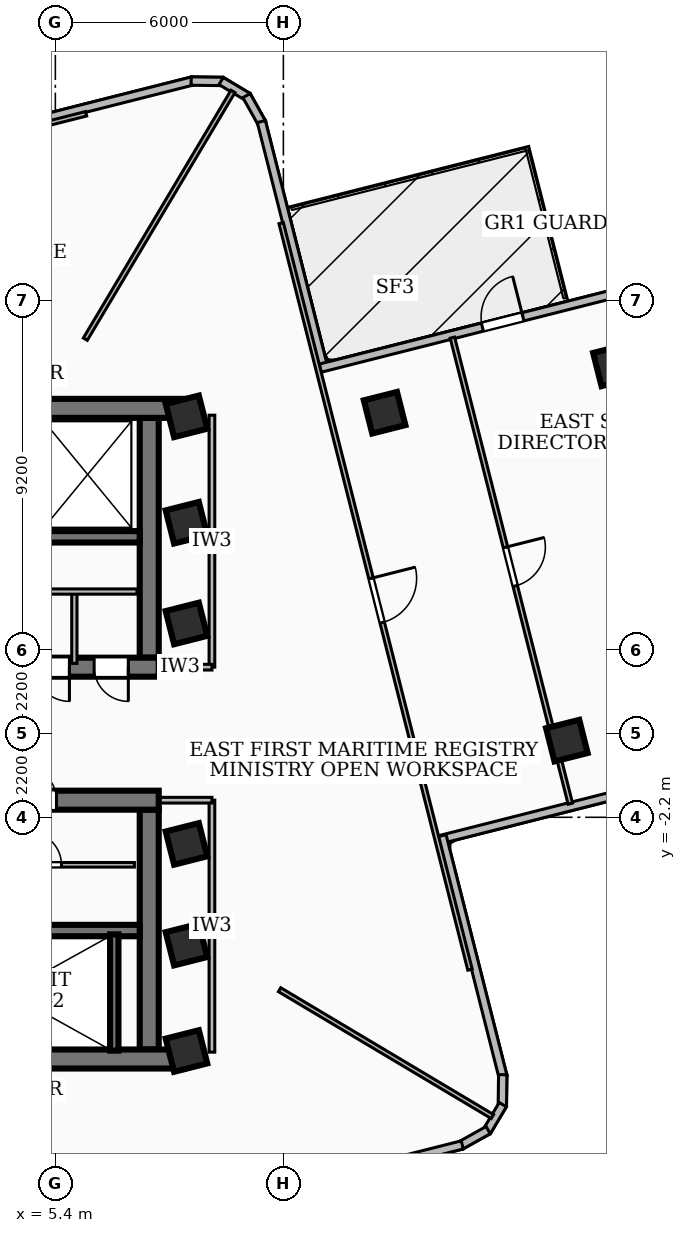
"""IFC4 building model, lengths in metres.
Left out: names, types, materials, properties, quantities, classifications, styles, units other than length and angle.
Written with IfcOpenShell. Run it as: python <this file> out.ifc"""

import sys

from ifc_helpers import new_model, si_unit, direction, frame, frame_2d, origin, origin_2d, place, context, subcontext, project, spatial, rectangle, extrude, element, fill, save


model = new_model("IFC4")
c1 = context("Model", 3, precision=1e-05, world=origin(), true_north=direction((0.0, 1.0)))
c2 = subcontext(c1, "Body", "Model", "MODEL_VIEW")
j1 = project(units=[si_unit("LENGTHUNIT", "METRE"), si_unit("PLANEANGLEUNIT", "RADIAN")], contexts=[c1])
p1 = place(None, origin())
s1 = spatial("IfcSite", under=j1, at=p1, CompositionType="ELEMENT")
p2 = place(p1, origin())
s2 = spatial("IfcBuilding", under=s1, at=p2, CompositionType="ELEMENT")
p3 = place(p2, frame((0.0, 0.0, 130.68)))
s3 = spatial("IfcBuildingStorey", under=s2, at=p3, CompositionType="ELEMENT", Elevation=130.68)
p4 = place(p3, frame((-8.78, 8.56, 0.0), z_axis=(0.0, 0.0, 1.0), x_axis=(1.0, 0.0, 0.0)))
e1 = element("IfcWall", 1, at=p4, inside=s3, PredefinedType="SHEAR", context=c2, shape_type="SweptSolid", body=[
    extrude(rectangle(XDim=17.56, YDim=0.5, at=frame_2d((8.78, 0.0))), origin(), (0.0, 0.0, 1.0), 3.32),
])
p5 = place(p3, frame((8.12, 1.75, 0.0), z_axis=(0.0, 0.0, 1.0), x_axis=(-1.0, 0.0, 0.0)))
e2 = element("IfcWall", 2, at=p5, inside=s3, PredefinedType="SHEAR", context=c2, shape_type="SweptSolid", body=[
    extrude(rectangle(XDim=16.24, YDim=0.5, at=frame_2d((8.12, 0.0))), origin(), (0.0, 0.0, 1.0), 3.32),
])
p6 = place(p5, frame((7.45, 0.0, 0.0)))
e3 = element("IfcOpeningElement", 3, at=p6, cuts=e2, PredefinedType="OPENING", context=c2, shape_type="SweptSolid", body=[
    extrude(rectangle(XDim=1.0, YDim=2.1, at=frame_2d((0.5, 1.05))), frame((0.0, 0.26, 0.0), z_axis=(0.0, -1.0, 0.0), x_axis=(1.0, 0.0, 0.0)), (0.0, 0.0, 1.0), 0.52),
])
p7 = place(p5, frame((3.85, 0.0, 0.0)))
e4 = element("IfcOpeningElement", 4, at=p7, cuts=e2, PredefinedType="OPENING", context=c2, shape_type="SweptSolid", body=[
    extrude(rectangle(XDim=0.9, YDim=2.06, at=frame_2d((0.45, 1.03))), frame((0.0, 0.26, 0.0), z_axis=(0.0, -1.0, 0.0), x_axis=(1.0, 0.0, 0.0)), (0.0, 0.0, 1.0), 0.52),
])
p8 = place(p5, frame((2.35, 0.0, 0.0)))
e5 = element("IfcOpeningElement", 5, at=p8, cuts=e2, PredefinedType="OPENING", context=c2, shape_type="SweptSolid", body=[
    extrude(rectangle(XDim=0.9, YDim=2.06, at=frame_2d((0.45, 1.03))), frame((0.0, 0.26, 0.0), z_axis=(0.0, -1.0, 0.0), x_axis=(1.0, 0.0, 0.0)), (0.0, 0.0, 1.0), 0.52),
])
p9 = place(p5, frame((0.8, 0.0, 0.0)))
e6 = element("IfcOpeningElement", 6, at=p9, cuts=e2, PredefinedType="OPENING", context=c2, shape_type="SweptSolid", body=[
    extrude(rectangle(XDim=0.9, YDim=2.06, at=frame_2d((0.45, 1.03))), frame((0.0, 0.26, 0.0), z_axis=(0.0, -1.0, 0.0), x_axis=(1.0, 0.0, 0.0)), (0.0, 0.0, 1.0), 0.52),
])
p10 = place(p3, frame((7.87, 8.31, 0.0), z_axis=(0.0, 0.0, 1.0), x_axis=(0.0, -1.0, 0.0)))
e7 = element("IfcWall", 7, at=p10, inside=s3, PredefinedType="SHEAR", context=c2, shape_type="SweptSolid", body=[
    extrude(rectangle(XDim=6.31, YDim=0.5, at=frame_2d((3.155, 0.0))), origin(), (0.0, 0.0, 1.0), 3.32),
])
p11 = place(p3, frame((7.62, 5.18, 0.0), z_axis=(0.0, 0.0, 1.0), x_axis=(-1.0, 0.0, 0.0)))
e8 = element("IfcWall", 8, at=p11, inside=s3, PredefinedType="SOLIDWALL", context=c2, shape_type="SweptSolid", body=[
    extrude(rectangle(XDim=15.24, YDim=0.3, at=frame_2d((7.62, 0.0))), origin(), (0.0, 0.0, 1.0), 3.32),
])
p12 = place(p11, frame((5.77, 0.0, 0.0)))
e9 = element("IfcOpeningElement", 9, at=p12, cuts=e8, PredefinedType="OPENING", context=c2, shape_type="SweptSolid", body=[
    extrude(rectangle(XDim=1.1, YDim=2.15, at=frame_2d((0.55, 1.075))), frame((0.0, 0.16, 0.0), z_axis=(0.0, -1.0, 0.0), x_axis=(1.0, 0.0, 0.0)), (0.0, 0.0, 1.0), 0.32),
])
p13 = place(p11, frame((2.97, 0.0, 0.0)))
e10 = element("IfcOpeningElement", 10, at=p13, cuts=e8, PredefinedType="OPENING", context=c2, shape_type="SweptSolid", body=[
    extrude(rectangle(XDim=1.1, YDim=2.15, at=frame_2d((0.55, 1.075))), frame((0.0, 0.16, 0.0), z_axis=(0.0, -1.0, 0.0), x_axis=(1.0, 0.0, 0.0)), (0.0, 0.0, 1.0), 0.32),
])
p14 = place(p11, frame((7.97, 0.0, 0.0)))
e11 = element("IfcOpeningElement", 11, at=p14, cuts=e8, PredefinedType="OPENING", context=c2, shape_type="SweptSolid", body=[
    extrude(rectangle(XDim=1.0, YDim=2.1, at=frame_2d((0.5, 1.05))), frame((0.0, 0.16, 0.0), z_axis=(0.0, -1.0, 0.0), x_axis=(1.0, 0.0, 0.0)), (0.0, 0.0, 1.0), 0.32),
])
p15 = place(p3, frame((8.78, -8.56, 0.0), z_axis=(0.0, 0.0, 1.0), x_axis=(-1.0, 0.0, 0.0)))
e12 = element("IfcWall", 12, at=p15, inside=s3, PredefinedType="SHEAR", context=c2, shape_type="SweptSolid", body=[
    extrude(rectangle(XDim=17.56, YDim=0.5, at=frame_2d((8.78, 0.0))), origin(), (0.0, 0.0, 1.0), 3.32),
])
p16 = place(p3, frame((-8.12, -1.75, 0.0), z_axis=(0.0, 0.0, 1.0), x_axis=(1.0, 0.0, 0.0)))
e13 = element("IfcWall", 13, at=p16, inside=s3, PredefinedType="SHEAR", context=c2, shape_type="SweptSolid", body=[
    extrude(rectangle(XDim=16.24, YDim=0.5, at=frame_2d((8.12, 0.0))), origin(), (0.0, 0.0, 1.0), 3.32),
])
p17 = place(p16, frame((7.45, 0.0, 0.0)))
e14 = element("IfcOpeningElement", 14, at=p17, cuts=e13, PredefinedType="OPENING", context=c2, shape_type="SweptSolid", body=[
    extrude(rectangle(XDim=1.0, YDim=2.1, at=frame_2d((0.5, 1.05))), frame((0.0, 0.26, 0.0), z_axis=(0.0, -1.0, 0.0), x_axis=(1.0, 0.0, 0.0)), (0.0, 0.0, 1.0), 0.52),
])
p18 = place(p16, frame((12.65, 0.0, 0.0)))
e15 = element("IfcOpeningElement", 15, at=p18, cuts=e13, PredefinedType="OPENING", context=c2, shape_type="SweptSolid", body=[
    extrude(rectangle(XDim=0.9, YDim=2.06, at=frame_2d((0.45, 1.03))), frame((0.0, 0.26, 0.0), z_axis=(0.0, -1.0, 0.0), x_axis=(1.0, 0.0, 0.0)), (0.0, 0.0, 1.0), 0.52),
])
p19 = place(p16, frame((0.565, 0.0, 0.0)))
e16 = element("IfcOpeningElement", 16, at=p19, cuts=e13, PredefinedType="OPENING", context=c2, shape_type="SweptSolid", body=[
    extrude(rectangle(XDim=1.05, YDim=2.15, at=frame_2d((0.525, 1.075))), frame((0.0, 0.26, 0.0), z_axis=(0.0, -1.0, 0.0), x_axis=(1.0, 0.0, 0.0)), (0.0, 0.0, 1.0), 0.52),
])
p20 = place(p16, frame((2.125, 0.0, 0.0)))
e17 = element("IfcOpeningElement", 17, at=p20, cuts=e13, PredefinedType="OPENING", context=c2, shape_type="SweptSolid", body=[
    extrude(rectangle(XDim=1.05, YDim=2.15, at=frame_2d((0.525, 1.075))), frame((0.0, 0.26, 0.0), z_axis=(0.0, -1.0, 0.0), x_axis=(1.0, 0.0, 0.0)), (0.0, 0.0, 1.0), 0.52),
])
p21 = place(p16, frame((3.685, 0.0, 0.0)))
e18 = element("IfcOpeningElement", 18, at=p21, cuts=e13, PredefinedType="OPENING", context=c2, shape_type="SweptSolid", body=[
    extrude(rectangle(XDim=1.05, YDim=2.15, at=frame_2d((0.525, 1.075))), frame((0.0, 0.26, 0.0), z_axis=(0.0, -1.0, 0.0), x_axis=(1.0, 0.0, 0.0)), (0.0, 0.0, 1.0), 0.52),
])
p22 = place(p3, frame((7.87, -2.0, 0.0), z_axis=(0.0, 0.0, 1.0), x_axis=(0.0, -1.0, 0.0)))
e19 = element("IfcWall", 19, at=p22, inside=s3, PredefinedType="SHEAR", context=c2, shape_type="SweptSolid", body=[
    extrude(rectangle(XDim=6.31, YDim=0.5, at=frame_2d((3.155, 0.0))), origin(), (0.0, 0.0, 1.0), 3.32),
])
p23 = place(p3, frame((-7.62, -5.18, 0.0), z_axis=(0.0, 0.0, 1.0), x_axis=(1.0, 0.0, 0.0)))
e20 = element("IfcWall", 20, at=p23, inside=s3, PredefinedType="SOLIDWALL", context=c2, shape_type="SweptSolid", body=[
    extrude(rectangle(XDim=15.24, YDim=0.3, at=frame_2d((7.62, 0.0))), origin(), (0.0, 0.0, 1.0), 3.32),
])
p24 = place(p23, frame((5.77, 0.0, 0.0)))
e21 = element("IfcOpeningElement", 21, at=p24, cuts=e20, PredefinedType="OPENING", context=c2, shape_type="SweptSolid", body=[
    extrude(rectangle(XDim=1.1, YDim=2.15, at=frame_2d((0.55, 1.075))), frame((0.0, 0.16, 0.0), z_axis=(0.0, -1.0, 0.0), x_axis=(1.0, 0.0, 0.0)), (0.0, 0.0, 1.0), 0.32),
])
p25 = place(p23, frame((7.97, 0.0, 0.0)))
e22 = element("IfcOpeningElement", 22, at=p25, cuts=e20, PredefinedType="OPENING", context=c2, shape_type="SweptSolid", body=[
    extrude(rectangle(XDim=1.0, YDim=2.1, at=frame_2d((0.5, 1.05))), frame((0.0, 0.16, 0.0), z_axis=(0.0, -1.0, 0.0), x_axis=(1.0, 0.0, 0.0)), (0.0, 0.0, 1.0), 0.32),
])
p26 = place(p3, frame((6.95, -8.34, 0.0), z_axis=(0.0, 0.0, 1.0), x_axis=(0.0, 1.0, 0.0)))
e23 = element("IfcWall", 23, at=p26, inside=s3, PredefinedType="SOLIDWALL", context=c2, shape_type="SweptSolid", body=[
    extrude(rectangle(XDim=3.06, YDim=0.22, at=frame_2d((1.53, 0.0))), origin(), (0.0, 0.0, 1.0), 3.32),
])
for number, where, z_axis, x_axis in (
    (24, (8.85, -5.55, 0.0), (0.0, 0.0, 1.0), (0.969, 0.245, 0.0)),
    (25, (8.85, -2.9, 0.0), (0.0, 0.0, 1.0), (0.969, 0.245, 0.0)),
    (26, (8.85, 2.9, 0.0), (0.0, 0.0, 1.0), (0.969, 0.245, 0.0)),
    (27, (8.85, 5.55, 0.0), (0.0, 0.0, 1.0), (0.969, 0.245, 0.0)),
    (28, (8.85, -8.35, 0.0), (0.0, 0.0, 1.0), (0.969, 0.245, 0.0)),
    (29, (8.85, 8.35, 0.0), (0.0, 0.0, 1.0), (0.969, 0.245, 0.0)),
    (30, (18.86, -0.183, 0.0), (0.0, 0.0, 1.0), (0.969, 0.245, 0.0)),
    (31, (14.064, 8.445, 0.0), (0.0, 0.0, 1.0), (0.969, 0.245, 0.0)),
    (32, (20.098, 9.692, 0.0), (0.0, 0.0, 1.0), (0.969, 0.245, 0.0)),
):
    element("IfcColumn", number, at=place(p3, frame(where, z_axis=z_axis, x_axis=x_axis)), inside=s3, PredefinedType="COLUMN", context=c2, shape_type="SweptSolid", body=[
        extrude(rectangle(XDim=0.9, YDim=0.9, at=origin_2d()), origin(), (0.0, 0.0, 1.0), 3.6),
    ])
p27 = place(p3, frame((2.684, 15.574, 0.0), z_axis=(0.0, 0.0, 1.0), x_axis=(0.969435490349, 0.245346347134, 0.0)))
e33 = element("IfcWall", 33, at=p27, inside=s3, PredefinedType="SOLIDWALL", context=c2, shape_type="SweptSolid", body=[
    extrude(rectangle(XDim=6.538, YDim=0.22, at=frame_2d((3.269, 0.0))), origin(), (0.0, 0.0, 1.0), 2.55),
])
p28 = place(p3, frame((8.973, 17.172, 0.0), z_axis=(0.0, 0.0, 1.0), x_axis=(0.999909345183, -0.013464821393, 0.0)))
e34 = element("IfcWall", 34, at=p28, inside=s3, PredefinedType="SOLIDWALL", context=c2, shape_type="SweptSolid", body=[
    extrude(rectangle(XDim=0.834, YDim=0.22, at=frame_2d((0.417, 0.0))), origin(), (0.0, 0.0, 1.0), 3.32),
])
p29 = place(p3, frame((9.761, 17.174, 0.0), z_axis=(0.0, 0.0, 1.0), x_axis=(0.858412031951, -0.512960801038, 0.0)))
e35 = element("IfcWall", 35, at=p29, inside=s3, PredefinedType="SOLIDWALL", context=c2, shape_type="SweptSolid", body=[
    extrude(rectangle(XDim=0.819, YDim=0.22, at=frame_2d((0.41, 0.0))), origin(), (0.0, 0.0, 1.0), 3.32),
])
p30 = place(p3, frame((10.431, 16.789, 0.0), z_axis=(0.0, 0.0, 1.0), x_axis=(0.487952561671, -0.872870149311, 0.0)))
e36 = element("IfcWall", 36, at=p30, inside=s3, PredefinedType="SOLIDWALL", context=c2, shape_type="SweptSolid", body=[
    extrude(rectangle(XDim=0.834, YDim=0.22, at=frame_2d((0.417, 0.0))), origin(), (0.0, 0.0, 1.0), 3.32),
])
p31 = place(p3, frame((10.82, 16.107, 0.0), z_axis=(0.0, 0.0, 1.0), x_axis=(0.245314006561, -0.969443674581, 0.0)))
e37 = element("IfcWall", 37, at=p31, inside=s3, PredefinedType="SOLIDWALL", context=c2, shape_type="SweptSolid", body=[
    extrude(rectangle(XDim=6.759, YDim=0.22, at=frame_2d((3.379, 0.0))), origin(), (0.0, 0.0, 1.0), 3.32),
])
p32 = place(p3, frame((12.371, 9.618, 0.0), z_axis=(0.0, 0.0, 1.0), x_axis=(0.969434127448, 0.245351732293, 0.0)))
e38 = element("IfcWall", 38, at=p32, inside=s3, PredefinedType="SOLIDWALL", context=c2, shape_type="SweptSolid", body=[
    extrude(rectangle(XDim=13.458, YDim=0.22, at=frame_2d((6.729, 0.0))), origin(), (0.0, 0.0, 1.0), 3.32),
])
p33 = place(p32, frame((4.4, 0.0, 0.0)))
e39 = element("IfcOpeningElement", 39, at=p33, cuts=e38, PredefinedType="OPENING", context=c2, shape_type="SweptSolid", body=[
    extrude(rectangle(XDim=1.1, YDim=2.1, at=frame_2d((0.55, 1.05))), frame((0.0, 0.12, 0.0), z_axis=(0.0, -1.0, 0.0), x_axis=(1.0, 0.0, 0.0)), (0.0, 0.0, 1.0), 0.24),
])
p34 = place(p3, frame((28.557, 0.511, 0.0), z_axis=(0.0, 0.0, 1.0), x_axis=(-0.969429758912, -0.245368992613, 0.0)))
e40 = element("IfcWall", 40, at=p34, inside=s3, PredefinedType="SOLIDWALL", context=c2, shape_type="SweptSolid", body=[
    extrude(rectangle(XDim=13.457, YDim=0.22, at=frame_2d((6.729, 0.0))), origin(), (0.0, 0.0, 1.0), 3.32),
])
p35 = place(p34, frame((0.85, 0.0, 0.85)))
e41 = element("IfcOpeningElement", 41, at=p35, cuts=e40, PredefinedType="OPENING", context=c2, shape_type="SweptSolid", body=[
    extrude(rectangle(XDim=2.4, YDim=1.65, at=frame_2d((1.2, 0.825))), frame((0.0, 0.12, 0.0), z_axis=(0.0, -1.0, 0.0), x_axis=(1.0, 0.0, 0.0)), (0.0, 0.0, 1.0), 0.24),
])
p36 = place(p3, frame((15.574, -2.684, 0.0), z_axis=(0.0, 0.0, 1.0), x_axis=(0.245346347134, -0.969435490349, 0.0)))
e42 = element("IfcWall", 42, at=p36, inside=s3, PredefinedType="SOLIDWALL", context=c2, shape_type="SweptSolid", body=[
    extrude(rectangle(XDim=6.538, YDim=0.22, at=frame_2d((3.269, 0.0))), origin(), (0.0, 0.0, 1.0), 3.32),
])
p37 = place(p3, frame((17.172, -8.973, 0.0), z_axis=(0.0, 0.0, 1.0), x_axis=(-0.013464821393, -0.999909345183, 0.0)))
e43 = element("IfcWall", 43, at=p37, inside=s3, PredefinedType="SOLIDWALL", context=c2, shape_type="SweptSolid", body=[
    extrude(rectangle(XDim=0.834, YDim=0.22, at=frame_2d((0.417, 0.0))), origin(), (0.0, 0.0, 1.0), 3.32),
])
p38 = place(p3, frame((17.174, -9.761, 0.0), z_axis=(0.0, 0.0, 1.0), x_axis=(-0.512960801038, -0.858412031951, 0.0)))
e44 = element("IfcWall", 44, at=p38, inside=s3, PredefinedType="SOLIDWALL", context=c2, shape_type="SweptSolid", body=[
    extrude(rectangle(XDim=0.819, YDim=0.22, at=frame_2d((0.41, 0.0))), origin(), (0.0, 0.0, 1.0), 3.32),
])
p39 = place(p3, frame((16.789, -10.431, 0.0), z_axis=(0.0, 0.0, 1.0), x_axis=(-0.872870149311, -0.487952561671, 0.0)))
e45 = element("IfcWall", 45, at=p39, inside=s3, PredefinedType="SOLIDWALL", context=c2, shape_type="SweptSolid", body=[
    extrude(rectangle(XDim=0.834, YDim=0.22, at=frame_2d((0.417, 0.0))), origin(), (0.0, 0.0, 1.0), 3.32),
])
p40 = place(p3, frame((16.107, -10.82, 0.0), z_axis=(0.0, 0.0, 1.0), x_axis=(-0.969443674581, -0.245314006561, 0.0)))
e46 = element("IfcWall", 46, at=p40, inside=s3, PredefinedType="SOLIDWALL", context=c2, shape_type="SweptSolid", body=[
    extrude(rectangle(XDim=6.759, YDim=0.22, at=frame_2d((3.379, 0.0))), origin(), (0.0, 0.0, 1.0), 3.32),
])
p41 = place(p3, frame((2.9, 3.74, 0.0), z_axis=(0.0, 0.0, 1.0), x_axis=(1.0, 0.0, 0.0)))
e47 = element("IfcWall", 47, at=p41, inside=s3, PredefinedType="PARTITIONING", context=c2, shape_type="SweptSolid", body=[
    extrude(rectangle(XDim=4.65, YDim=0.138, at=frame_2d((2.325, 0.0))), origin(), (0.0, 0.0, 1.0), 3.32),
])
p42 = place(p3, frame((2.8, -3.45, 0.0), z_axis=(0.0, 0.0, 1.0), x_axis=(1.0, 0.0, 0.0)))
e48 = element("IfcWall", 48, at=p42, inside=s3, PredefinedType="PARTITIONING", context=c2, shape_type="SweptSolid", body=[
    extrude(rectangle(XDim=4.68, YDim=0.12, at=frame_2d((2.34, 0.0))), origin(), (0.0, 0.0, 1.0), 3.32),
])
p43 = place(p42, frame((1.9, 0.0, 0.0)))
e49 = element("IfcOpeningElement", 49, at=p43, cuts=e48, PredefinedType="OPENING", context=c2, shape_type="SweptSolid", body=[
    extrude(rectangle(XDim=0.86, YDim=2.04, at=frame_2d((0.43, 1.02))), frame((0.0, 0.07, 0.0), z_axis=(0.0, -1.0, 0.0), x_axis=(1.0, 0.0, 0.0)), (0.0, 0.0, 1.0), 0.14),
])
p44 = place(p3, frame((5.9, 1.85, 0.0), z_axis=(0.0, 0.0, 1.0), x_axis=(0.0, 1.0, 0.0)))
e50 = element("IfcWall", 50, at=p44, inside=s3, PredefinedType="PARTITIONING", context=c2, shape_type="SweptSolid", body=[
    extrude(rectangle(XDim=1.89, YDim=0.138, at=frame_2d((0.945, 0.0))), origin(), (0.0, 0.0, 1.0), 2.55),
])
p45 = place(p3, frame((9.52, 1.75, 0.0), z_axis=(0.0, 0.0, 1.0), x_axis=(0.0, 1.0, 0.0)))
e51 = element("IfcWall", 51, at=p45, inside=s3, PredefinedType="PARTITIONING", context=c2, shape_type="SweptSolid", body=[
    extrude(rectangle(XDim=6.63, YDim=0.15, at=frame_2d((3.315, 0.0))), origin(), (0.0, 0.0, 1.0), 2.55),
])
p46 = place(p3, frame((7.85, 1.75, 0.0), z_axis=(0.0, 0.0, 1.0), x_axis=(1.0, 0.0, 0.0)))
e52 = element("IfcWall", 52, at=p46, inside=s3, PredefinedType="PARTITIONING", context=c2, shape_type="SweptSolid", body=[
    extrude(rectangle(XDim=1.67, YDim=0.15, at=frame_2d((0.835, 0.0))), origin(), (0.0, 0.0, 1.0), 2.55),
])
p47 = place(p3, frame((9.52, -8.38, 0.0), z_axis=(0.0, 0.0, 1.0), x_axis=(0.0, 1.0, 0.0)))
e53 = element("IfcWall", 53, at=p47, inside=s3, PredefinedType="PARTITIONING", context=c2, shape_type="SweptSolid", body=[
    extrude(rectangle(XDim=6.63, YDim=0.15, at=frame_2d((3.315, 0.0))), origin(), (0.0, 0.0, 1.0), 2.55),
])
p48 = place(p3, frame((7.85, -1.75, 0.0), z_axis=(0.0, 0.0, 1.0), x_axis=(1.0, 0.0, 0.0)))
e54 = element("IfcWall", 54, at=p48, inside=s3, PredefinedType="PARTITIONING", context=c2, shape_type="SweptSolid", body=[
    extrude(rectangle(XDim=1.67, YDim=0.15, at=frame_2d((0.835, 0.0))), origin(), (0.0, 0.0, 1.0), 2.55),
])
p49 = place(p3, frame((6.188, 10.38, 0.0), z_axis=(0.0, 0.0, 1.0), x_axis=(0.511972353143, 0.859001926434, 0.0)))
e55 = element("IfcWall", 55, at=p49, inside=s3, PredefinedType="PARTITIONING", context=c2, shape_type="SweptSolid", body=[
    extrude(rectangle(XDim=7.59, YDim=0.12, at=frame_2d((3.795, 0.0))), origin(), (0.0, 0.0, 1.0), 2.55),
])
p50 = place(p3, frame((11.3, -6.736, 0.0), z_axis=(0.0, 0.0, 1.0), x_axis=(0.858979599017, -0.512009812868, 0.0)))
e56 = element("IfcWall", 56, at=p50, inside=s3, PredefinedType="PARTITIONING", context=c2, shape_type="SweptSolid", body=[
    extrude(rectangle(XDim=6.519, YDim=0.12, at=frame_2d((3.26, 0.0))), origin(), (0.0, 0.0, 1.0), 3.32),
])
p51 = place(p3, frame((11.342, 13.433, 0.0), z_axis=(0.0, 0.0, 1.0), x_axis=(0.24525085526, -0.969459652587, 0.0)))
e57 = element("IfcWall", 57, at=p51, inside=s3, PredefinedType="PARTITIONING", context=c2, shape_type="SweptSolid", body=[
    extrude(rectangle(XDim=20.261, YDim=0.12, at=frame_2d((10.13, 0.0))), origin(), (0.0, 0.0, 1.0), 2.55),
])
p52 = place(p51, frame((9.64, 0.0, 0.0)))
e58 = element("IfcOpeningElement", 58, at=p52, cuts=e57, PredefinedType="OPENING", context=c2, shape_type="SweptSolid", body=[
    extrude(rectangle(XDim=1.2, YDim=2.1, at=frame_2d((0.6, 1.05))), frame((0.0, 0.07, 0.0), z_axis=(0.0, -1.0, 0.0), x_axis=(1.0, 0.0, 0.0)), (0.0, 0.0, 1.0), 0.14),
])
p53 = place(p3, frame((15.848, 10.421, 0.0), z_axis=(0.0, 0.0, 1.0), x_axis=(0.24530936383, -0.969444849394, 0.0)))
e59 = element("IfcWall", 59, at=p53, inside=s3, PredefinedType="PARTITIONING", context=c2, shape_type="SweptSolid", body=[
    extrude(rectangle(XDim=12.649, YDim=0.12, at=frame_2d((6.325, 0.0))), origin(), (0.0, 0.0, 1.0), 2.55),
])
p54 = place(p53, frame((5.69, 0.0, 0.0)))
e60 = element("IfcOpeningElement", 60, at=p54, cuts=e59, PredefinedType="OPENING", context=c2, shape_type="SweptSolid", body=[
    extrude(rectangle(XDim=1.05, YDim=2.08, at=frame_2d((0.525, 1.04))), frame((0.0, 0.07, 0.0), z_axis=(0.0, -1.0, 0.0), x_axis=(1.0, 0.0, 0.0)), (0.0, 0.0, 1.0), 0.14),
])
p55 = place(p3, frame((-13.433, 11.342, 0.0), z_axis=(0.0, 0.0, 1.0), x_axis=(0.969459652587, 0.24525085526, 0.0)))
e61 = element("IfcWall", 61, at=p55, inside=s3, PredefinedType="PARTITIONING", context=c2, shape_type="SweptSolid", body=[
    extrude(rectangle(XDim=20.261, YDim=0.12, at=frame_2d((10.13, 0.0))), origin(), (0.0, 0.0, 1.0), 2.55),
])
p56 = place(p55, frame((9.64, 0.0, 0.0)))
e62 = element("IfcOpeningElement", 62, at=p56, cuts=e61, PredefinedType="OPENING", context=c2, shape_type="SweptSolid", body=[
    extrude(rectangle(XDim=1.2, YDim=2.1, at=frame_2d((0.6, 1.05))), frame((0.0, 0.07, 0.0), z_axis=(0.0, -1.0, 0.0), x_axis=(1.0, 0.0, 0.0)), (0.0, 0.0, 1.0), 0.14),
])
p57 = place(p33, origin())
e63 = element("IfcDoor", 63, at=p57, inside=s3, OperationType="SINGLE_SWING_RIGHT", PredefinedType="DOOR", context=c2, shape_type="SweptSolid", body=[
    extrude(rectangle(XDim=1.1, YDim=2.1, at=frame_2d((0.55, 1.05))), frame((0.0, 0.025, 0.0), z_axis=(0.0, -1.0, 0.0), x_axis=(1.0, 0.0, 0.0)), (0.0, 0.0, 1.0), 0.05),
])
fill(e39, e63)
p58 = place(p18, origin())
e64 = element("IfcDoor", 64, at=p58, inside=s3, OperationType="SINGLE_SWING_LEFT", PredefinedType="DOOR", context=c2, shape_type="SweptSolid", body=[
    extrude(rectangle(XDim=0.9, YDim=2.06, at=frame_2d((0.45, 1.03))), frame((0.0, 0.025, 0.0), z_axis=(0.0, -1.0, 0.0), x_axis=(1.0, 0.0, 0.0)), (0.0, 0.0, 1.0), 0.05),
])
fill(e15, e64)
p59 = place(p8, origin())
e65 = element("IfcDoor", 65, at=p59, inside=s3, OperationType="SINGLE_SWING_LEFT", PredefinedType="DOOR", context=c2, shape_type="SweptSolid", body=[
    extrude(rectangle(XDim=0.9, YDim=2.06, at=frame_2d((0.45, 1.03))), frame((0.0, 0.025, 0.0), z_axis=(0.0, -1.0, 0.0), x_axis=(1.0, 0.0, 0.0)), (0.0, 0.0, 1.0), 0.05),
])
fill(e5, e65)
p60 = place(p9, origin())
e66 = element("IfcDoor", 66, at=p60, inside=s3, OperationType="SINGLE_SWING_LEFT", PredefinedType="DOOR", context=c2, shape_type="SweptSolid", body=[
    extrude(rectangle(XDim=0.9, YDim=2.06, at=frame_2d((0.45, 1.03))), frame((0.0, 0.025, 0.0), z_axis=(0.0, -1.0, 0.0), x_axis=(1.0, 0.0, 0.0)), (0.0, 0.0, 1.0), 0.05),
])
fill(e6, e66)
p61 = place(p43, origin())
e67 = element("IfcDoor", 67, at=p61, inside=s3, OperationType="SINGLE_SWING_LEFT", PredefinedType="DOOR", context=c2, shape_type="SweptSolid", body=[
    extrude(rectangle(XDim=0.86, YDim=2.04, at=frame_2d((0.43, 1.02))), frame((0.0, 0.025, 0.0), z_axis=(0.0, -1.0, 0.0), x_axis=(1.0, 0.0, 0.0)), (0.0, 0.0, 1.0), 0.05),
])
fill(e49, e67)
p62 = place(p52, origin())
e68 = element("IfcDoor", 68, at=p62, inside=s3, OperationType="SINGLE_SWING_LEFT", PredefinedType="DOOR", context=c2, shape_type="SweptSolid", body=[
    extrude(rectangle(XDim=1.2, YDim=2.1, at=frame_2d((0.6, 1.05))), frame((0.0, 0.025, 0.0), z_axis=(0.0, -1.0, 0.0), x_axis=(1.0, 0.0, 0.0)), (0.0, 0.0, 1.0), 0.05),
])
fill(e58, e68)
p63 = place(p54, origin())
e69 = element("IfcDoor", 69, at=p63, inside=s3, OperationType="SINGLE_SWING_LEFT", PredefinedType="DOOR", context=c2, shape_type="SweptSolid", body=[
    extrude(rectangle(XDim=1.05, YDim=2.08, at=frame_2d((0.525, 1.04))), frame((0.0, 0.025, 0.0), z_axis=(0.0, -1.0, 0.0), x_axis=(1.0, 0.0, 0.0)), (0.0, 0.0, 1.0), 0.05),
])
fill(e60, e69)
save(model, sys.argv[1])
